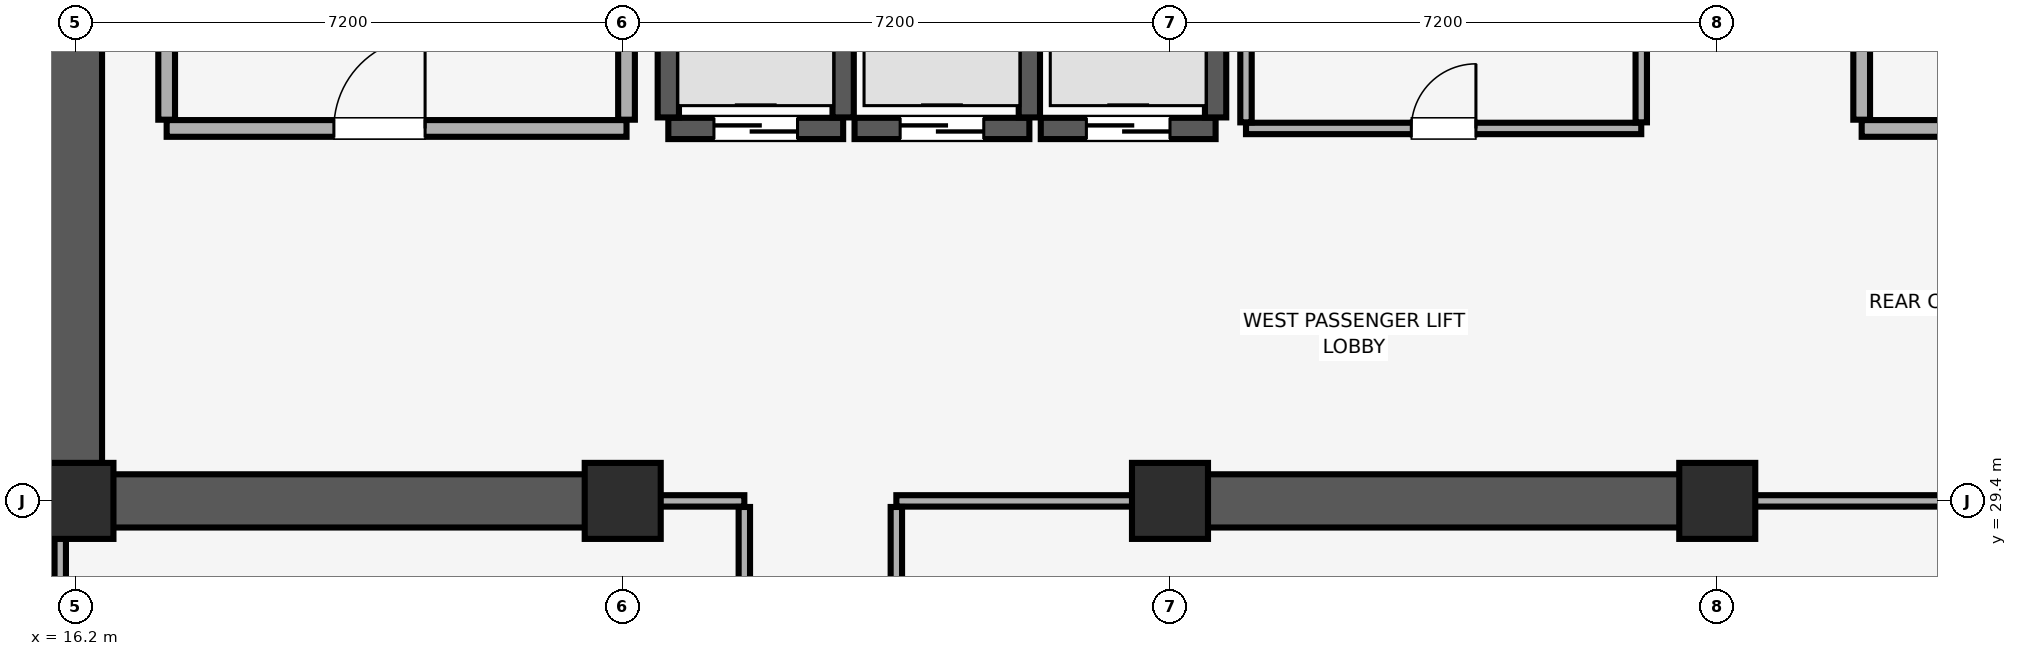
"""IFC4 building model, lengths in metres.
Left out: names, types, materials, properties, quantities, classifications, styles, units other than length and angle.
Written with IfcOpenShell. Run it as: python <this file> out.ifc"""

import sys

from ifc_helpers import new_model, si_unit, direction, frame, frame_2d, origin, origin_2d, place, context, subcontext, project, spatial, rectangle, extrude, element, fill, save


model = new_model("IFC4")
c1 = context("Model", 3, precision=1e-05, world=origin(), true_north=direction((0.0, 1.0)))
c2 = subcontext(c1, "Body", "Model", "MODEL_VIEW")
j1 = project(units=[si_unit("LENGTHUNIT", "METRE"), si_unit("PLANEANGLEUNIT", "RADIAN")], contexts=[c1])
p1 = place(None, origin())
s1 = spatial("IfcSite", under=j1, at=p1, CompositionType="ELEMENT")
p2 = place(p1, origin())
s2 = spatial("IfcBuilding", under=s1, at=p2, CompositionType="ELEMENT")
p3 = place(p2, frame((0.0, 0.0, 290.3)))
s3 = spatial("IfcBuildingStorey", under=s2, at=p3, CompositionType="ELEMENT", Elevation=290.3)
for number, where, z_axis, x_axis in (
    (1, (16.2, 29.4, 0.0), (0.0, 0.0, 1.0), (1.0, 0.0, 0.0)),
    (2, (23.4, 29.4, 0.0), (0.0, 0.0, 1.0), (1.0, 0.0, 0.0)),
    (3, (30.6, 29.4, 0.0), (0.0, 0.0, 1.0), (1.0, 0.0, 0.0)),
    (4, (37.8, 29.4, 0.0), (0.0, 0.0, 1.0), (1.0, 0.0, 0.0)),
):
    element("IfcColumn", number, at=place(p3, frame(where, z_axis=z_axis, x_axis=x_axis)), inside=s3, PredefinedType="COLUMN", context=c2, shape_type="SweptSolid", body=[
        extrude(rectangle(XDim=1.0, YDim=1.0, at=origin_2d()), origin(), (0.0, 0.0, 1.0), 4.02),
    ])
p4 = place(p3, frame((16.2, 29.4, 0.0), z_axis=(0.0, 0.0, 1.0), x_axis=(0.0, 1.0, 0.0)))
e5 = element("IfcWall", 5, at=p4, inside=s3, PredefinedType="SHEAR", context=c2, shape_type="SweptSolid", body=[
    extrude(rectangle(XDim=19.2, YDim=0.7, at=frame_2d((9.6, 0.0))), origin(), (0.0, 0.0, 1.0), 4.02),
])
p5 = place(p3, frame((16.555, 29.4, 0.0), z_axis=(0.0, 0.0, 1.0), x_axis=(1.0, 0.0, 0.0)))
e6 = element("IfcWall", 6, at=p5, inside=s3, PredefinedType="SHEAR", context=c2, shape_type="SweptSolid", body=[
    extrude(rectangle(XDim=7.045, YDim=0.7, at=frame_2d((3.522, 0.0))), origin(), (0.0, 0.0, 1.0), 4.02),
])
p6 = place(p3, frame((30.4, 29.4, 0.0), z_axis=(0.0, 0.0, 1.0), x_axis=(1.0, 0.0, 0.0)))
e7 = element("IfcWall", 7, at=p6, inside=s3, PredefinedType="SHEAR", context=c2, shape_type="SweptSolid", body=[
    extrude(rectangle(XDim=7.6, YDim=0.7, at=frame_2d((3.8, 0.0))), origin(), (0.0, 0.0, 1.0), 4.02),
])
p7 = place(p3, frame((24.0, 34.3, 0.0), z_axis=(0.0, 0.0, 1.0), x_axis=(1.0, 0.0, 0.0)))
e8 = element("IfcWall", 8, at=p7, inside=s3, PredefinedType="SHEAR", context=c2, shape_type="SweptSolid", body=[
    extrude(rectangle(XDim=2.3, YDim=0.28, at=frame_2d((1.15, 0.0))), origin(), (0.0, 0.0, 1.0), 4.02),
])
p8 = place(p7, frame((0.6, 0.0, 0.0)))
e9 = element("IfcOpeningElement", 9, at=p8, cuts=e8, PredefinedType="OPENING", context=c2, shape_type="SweptSolid", body=[
    extrude(rectangle(XDim=1.1, YDim=2.2, at=frame_2d((0.55, 1.1))), frame((0.0, 0.15, 0.0), z_axis=(0.0, -1.0, 0.0), x_axis=(1.0, 0.0, 0.0)), (0.0, 0.0, 1.0), 0.3),
])
for number, where, z_axis, x_axis in (
    (10, (24.0, 34.445, 0.0), (0.0, 0.0, 1.0), (0.0, 1.0, 0.0)),
    (11, (26.3, 34.445, 0.0), (0.0, 0.0, 1.0), (0.0, 1.0, 0.0)),
):
    element("IfcWall", number, at=place(p3, frame(where, z_axis=z_axis, x_axis=x_axis)), inside=s3, PredefinedType="SHEAR", context=c2, shape_type="SweptSolid", body=[
        extrude(rectangle(XDim=2.01, YDim=0.28, at=frame_2d((1.005, 0.0))), origin(), (0.0, 0.0, 1.0), 4.02),
    ])
p9 = place(p3, frame((26.45, 34.3, 0.0), z_axis=(0.0, 0.0, 1.0), x_axis=(1.0, 0.0, 0.0)))
e12 = element("IfcWall", 12, at=p9, inside=s3, PredefinedType="SHEAR", context=c2, shape_type="SweptSolid", body=[
    extrude(rectangle(XDim=2.3, YDim=0.28, at=frame_2d((1.15, 0.0))), origin(), (0.0, 0.0, 1.0), 4.02),
])
p10 = place(p9, frame((0.6, 0.0, 0.0)))
e13 = element("IfcOpeningElement", 13, at=p10, cuts=e12, PredefinedType="OPENING", context=c2, shape_type="SweptSolid", body=[
    extrude(rectangle(XDim=1.1, YDim=2.2, at=frame_2d((0.55, 1.1))), frame((0.0, 0.15, 0.0), z_axis=(0.0, -1.0, 0.0), x_axis=(1.0, 0.0, 0.0)), (0.0, 0.0, 1.0), 0.3),
])
p11 = place(p3, frame((28.75, 34.445, 0.0), z_axis=(0.0, 0.0, 1.0), x_axis=(0.0, 1.0, 0.0)))
e14 = element("IfcWall", 14, at=p11, inside=s3, PredefinedType="SHEAR", context=c2, shape_type="SweptSolid", body=[
    extrude(rectangle(XDim=2.01, YDim=0.28, at=frame_2d((1.005, 0.0))), origin(), (0.0, 0.0, 1.0), 4.02),
])
p12 = place(p3, frame((28.9, 34.3, 0.0), z_axis=(0.0, 0.0, 1.0), x_axis=(1.0, 0.0, 0.0)))
e15 = element("IfcWall", 15, at=p12, inside=s3, PredefinedType="SHEAR", context=c2, shape_type="SweptSolid", body=[
    extrude(rectangle(XDim=2.3, YDim=0.28, at=frame_2d((1.15, 0.0))), origin(), (0.0, 0.0, 1.0), 4.02),
])
p13 = place(p12, frame((0.6, 0.0, 0.0)))
e16 = element("IfcOpeningElement", 16, at=p13, cuts=e15, PredefinedType="OPENING", context=c2, shape_type="SweptSolid", body=[
    extrude(rectangle(XDim=1.1, YDim=2.2, at=frame_2d((0.55, 1.1))), frame((0.0, 0.15, 0.0), z_axis=(0.0, -1.0, 0.0), x_axis=(1.0, 0.0, 0.0)), (0.0, 0.0, 1.0), 0.3),
])
p14 = place(p3, frame((31.2, 34.445, 0.0), z_axis=(0.0, 0.0, 1.0), x_axis=(0.0, 1.0, 0.0)))
e17 = element("IfcWall", 17, at=p14, inside=s3, PredefinedType="SHEAR", context=c2, shape_type="SweptSolid", body=[
    extrude(rectangle(XDim=2.01, YDim=0.28, at=frame_2d((1.005, 0.0))), origin(), (0.0, 0.0, 1.0), 4.02),
])
p15 = place(p3, frame((17.4, 34.3, 0.0), z_axis=(0.0, 0.0, 1.0), x_axis=(1.0, 0.0, 0.0)))
e18 = element("IfcWall", 18, at=p15, inside=s3, PredefinedType="PARTITIONING", context=c2, shape_type="SweptSolid", body=[
    extrude(rectangle(XDim=6.05, YDim=0.22, at=frame_2d((3.025, 0.0))), origin(), (0.0, 0.0, 1.0), 4.02),
])
p16 = place(p15, frame((2.2, 0.0, 0.0)))
e19 = element("IfcOpeningElement", 19, at=p16, cuts=e18, PredefinedType="OPENING", context=c2, shape_type="SweptSolid", body=[
    extrude(rectangle(XDim=1.2, YDim=2.15, at=frame_2d((0.6, 1.075))), frame((0.0, 0.12, 0.0), z_axis=(0.0, -1.0, 0.0), x_axis=(1.0, 0.0, 0.0)), (0.0, 0.0, 1.0), 0.24),
])
p17 = place(p3, frame((17.4, 34.415, 0.0), z_axis=(0.0, 0.0, 1.0), x_axis=(0.0, 1.0, 0.0)))
e20 = element("IfcWall", 20, at=p17, inside=s3, PredefinedType="PARTITIONING", context=c2, shape_type="SweptSolid", body=[
    extrude(rectangle(XDim=5.43, YDim=0.22, at=frame_2d((2.715, 0.0))), origin(), (0.0, 0.0, 1.0), 4.02),
])
p18 = place(p3, frame((23.45, 34.415, 0.0), z_axis=(0.0, 0.0, 1.0), x_axis=(0.0, 1.0, 0.0)))
e21 = element("IfcWall", 21, at=p18, inside=s3, PredefinedType="PARTITIONING", context=c2, shape_type="SweptSolid", body=[
    extrude(rectangle(XDim=5.64, YDim=0.22, at=frame_2d((2.82, 0.0))), origin(), (0.0, 0.0, 1.0), 4.02),
])
p19 = place(p3, frame((39.7, 34.3, 0.0), z_axis=(0.0, 0.0, 1.0), x_axis=(1.0, 0.0, 0.0)))
e22 = element("IfcWall", 22, at=p19, inside=s3, PredefinedType="PARTITIONING", context=c2, shape_type="SweptSolid", body=[
    extrude(rectangle(XDim=4.6, YDim=0.22, at=frame_2d((2.3, 0.0))), origin(), (0.0, 0.0, 1.0), 4.02),
])
p20 = place(p19, frame((1.7, 0.0, 0.0)))
e23 = element("IfcOpeningElement", 23, at=p20, cuts=e22, PredefinedType="OPENING", context=c2, shape_type="SweptSolid", body=[
    extrude(rectangle(XDim=1.2, YDim=2.15, at=frame_2d((0.6, 1.075))), frame((0.0, 0.12, 0.0), z_axis=(0.0, -1.0, 0.0), x_axis=(1.0, 0.0, 0.0)), (0.0, 0.0, 1.0), 0.24),
])
p21 = place(p3, frame((39.7, 34.415, 0.0), z_axis=(0.0, 0.0, 1.0), x_axis=(0.0, 1.0, 0.0)))
e24 = element("IfcWall", 24, at=p21, inside=s3, PredefinedType="PARTITIONING", context=c2, shape_type="SweptSolid", body=[
    extrude(rectangle(XDim=5.785, YDim=0.22, at=frame_2d((2.893, 0.0))), origin(), (0.0, 0.0, 1.0), 4.02),
])
p22 = place(p3, frame((31.6, 34.3, 0.0), z_axis=(0.0, 0.0, 1.0), x_axis=(1.0, 0.0, 0.0)))
e25 = element("IfcWall", 25, at=p22, inside=s3, PredefinedType="PARTITIONING", context=c2, shape_type="SweptSolid", body=[
    extrude(rectangle(XDim=5.2, YDim=0.15, at=frame_2d((2.6, 0.0))), origin(), (0.0, 0.0, 1.0), 4.02),
])
p23 = place(p22, frame((2.175, 0.0, 0.0)))
e26 = element("IfcOpeningElement", 26, at=p23, cuts=e25, PredefinedType="OPENING", context=c2, shape_type="SweptSolid", body=[
    extrude(rectangle(XDim=0.85, YDim=2.1, at=frame_2d((0.425, 1.05))), frame((0.0, 0.085, 0.0), z_axis=(0.0, -1.0, 0.0), x_axis=(1.0, 0.0, 0.0)), (0.0, 0.0, 1.0), 0.17),
])
for number, where, z_axis, x_axis in (
    (27, (31.6, 34.38, 0.0), (0.0, 0.0, 1.0), (0.0, 1.0, 0.0)),
    (28, (36.8, 34.38, 0.0), (0.0, 0.0, 1.0), (0.0, 1.0, 0.0)),
):
    element("IfcWall", number, at=place(p3, frame(where, z_axis=z_axis, x_axis=x_axis)), inside=s3, PredefinedType="PARTITIONING", context=c2, shape_type="SweptSolid", body=[
        extrude(rectangle(XDim=4.94, YDim=0.15, at=frame_2d((2.47, 0.0))), origin(), (0.0, 0.0, 1.0), 4.02),
    ])
p24 = place(p3, frame((23.61, 29.4, 0.0), z_axis=(0.0, 0.0, 1.0), x_axis=(1.0, 0.0, 0.0)))
e29 = element("IfcWall", 29, at=p24, inside=s3, PredefinedType="PARTITIONING", context=c2, shape_type="SweptSolid", body=[
    extrude(rectangle(XDim=1.39, YDim=0.15, at=frame_2d((0.695, 0.0))), origin(), (0.0, 0.0, 1.0), 2.92),
])
p25 = place(p3, frame((16.0, 24.88, 0.0), z_axis=(0.0, 0.0, 1.0), x_axis=(0.0, 1.0, 0.0)))
e30 = element("IfcWall", 30, at=p25, inside=s3, PredefinedType="PARTITIONING", context=c2, shape_type="SweptSolid", body=[
    extrude(rectangle(XDim=4.51, YDim=0.15, at=frame_2d((2.255, 0.0))), origin(), (0.0, 0.0, 1.0), 3.66),
])
p26 = place(p3, frame((25.0, 24.88, 0.0), z_axis=(0.0, 0.0, 1.0), x_axis=(0.0, 1.0, 0.0)))
e31 = element("IfcWall", 31, at=p26, inside=s3, PredefinedType="PARTITIONING", context=c2, shape_type="SweptSolid", body=[
    extrude(rectangle(XDim=4.44, YDim=0.15, at=frame_2d((2.22, 0.0))), origin(), (0.0, 0.0, 1.0), 4.02),
])
p27 = place(p3, frame((27.0, 29.4, 0.0), z_axis=(0.0, 0.0, 1.0), x_axis=(1.0, 0.0, 0.0)))
e32 = element("IfcWall", 32, at=p27, inside=s3, PredefinedType="PARTITIONING", context=c2, shape_type="SweptSolid", body=[
    extrude(rectangle(XDim=3.39, YDim=0.15, at=frame_2d((1.695, 0.0))), origin(), (0.0, 0.0, 1.0), 2.92),
])
p28 = place(p3, frame((38.01, 29.4, 0.0), z_axis=(0.0, 0.0, 1.0), x_axis=(1.0, 0.0, 0.0)))
e33 = element("IfcWall", 33, at=p28, inside=s3, PredefinedType="PARTITIONING", context=c2, shape_type="SweptSolid", body=[
    extrude(rectangle(XDim=6.59, YDim=0.15, at=frame_2d((3.295, 0.0))), origin(), (0.0, 0.0, 1.0), 2.92),
])
p29 = place(p3, frame((27.0, 24.88, 0.0), z_axis=(0.0, 0.0, 1.0), x_axis=(0.0, 1.0, 0.0)))
e34 = element("IfcWall", 34, at=p29, inside=s3, PredefinedType="PARTITIONING", context=c2, shape_type="SweptSolid", body=[
    extrude(rectangle(XDim=4.44, YDim=0.15, at=frame_2d((2.22, 0.0))), origin(), (0.0, 0.0, 1.0), 3.66),
])
p30 = place(p8, origin())
e35 = element("IfcDoor", 35, at=p30, inside=s3, OperationType="DOUBLE_DOOR_SLIDING", PredefinedType="DOOR", context=c2, shape_type="SweptSolid", body=[
    extrude(rectangle(XDim=1.1, YDim=2.2, at=frame_2d((0.55, 1.1))), frame((0.0, 0.025, 0.0), z_axis=(0.0, -1.0, 0.0), x_axis=(1.0, 0.0, 0.0)), (0.0, 0.0, 1.0), 0.05),
])
fill(e9, e35)
p31 = place(p10, origin())
e36 = element("IfcDoor", 36, at=p31, inside=s3, OperationType="DOUBLE_DOOR_SLIDING", PredefinedType="DOOR", context=c2, shape_type="SweptSolid", body=[
    extrude(rectangle(XDim=1.1, YDim=2.2, at=frame_2d((0.55, 1.1))), frame((0.0, 0.025, 0.0), z_axis=(0.0, -1.0, 0.0), x_axis=(1.0, 0.0, 0.0)), (0.0, 0.0, 1.0), 0.05),
])
fill(e13, e36)
p32 = place(p13, origin())
e37 = element("IfcDoor", 37, at=p32, inside=s3, OperationType="DOUBLE_DOOR_SLIDING", PredefinedType="DOOR", context=c2, shape_type="SweptSolid", body=[
    extrude(rectangle(XDim=1.1, YDim=2.2, at=frame_2d((0.55, 1.1))), frame((0.0, 0.025, 0.0), z_axis=(0.0, -1.0, 0.0), x_axis=(1.0, 0.0, 0.0)), (0.0, 0.0, 1.0), 0.05),
])
fill(e16, e37)
p33 = place(p16, origin())
e38 = element("IfcDoor", 38, at=p33, inside=s3, OperationType="SINGLE_SWING_RIGHT", PredefinedType="DOOR", context=c2, shape_type="SweptSolid", body=[
    extrude(rectangle(XDim=1.2, YDim=2.15, at=frame_2d((0.6, 1.075))), frame((0.0, 0.025, 0.0), z_axis=(0.0, -1.0, 0.0), x_axis=(1.0, 0.0, 0.0)), (0.0, 0.0, 1.0), 0.05),
])
fill(e19, e38)
p34 = place(p23, origin())
e39 = element("IfcDoor", 39, at=p34, inside=s3, OperationType="SINGLE_SWING_RIGHT", PredefinedType="DOOR", context=c2, shape_type="SweptSolid", body=[
    extrude(rectangle(XDim=0.85, YDim=2.1, at=frame_2d((0.425, 1.05))), frame((0.0, 0.025, 0.0), z_axis=(0.0, -1.0, 0.0), x_axis=(1.0, 0.0, 0.0)), (0.0, 0.0, 1.0), 0.05),
])
fill(e26, e39)
save(model, sys.argv[1])
